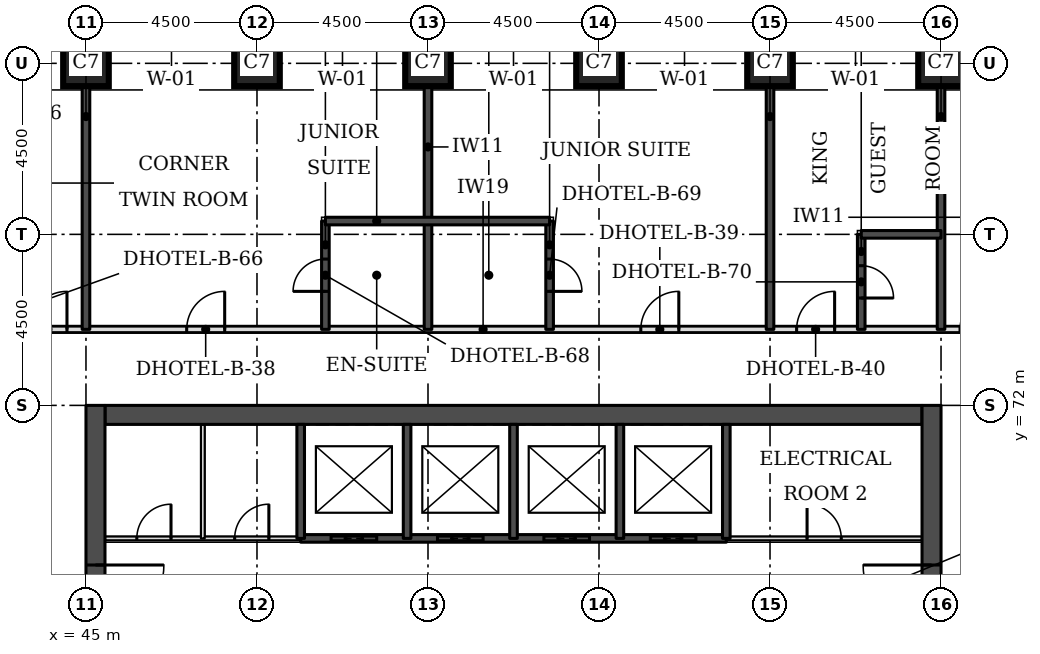
"""IFC4 building model, lengths in metres.
Left out: names, types, materials, properties, quantities, classifications, styles, units other than length and angle.
Written with IfcOpenShell. Run it as: python <this file> out.ifc"""

import sys

from ifc_helpers import new_model, si_unit, direction, frame, frame_2d, origin, origin_2d, place, context, subcontext, project, spatial, rectangle, extrude, element, fill, save


model = new_model("IFC4")
c1 = context("Model", 3, precision=1e-05, world=origin(), true_north=direction((0.0, 1.0)))
c2 = subcontext(c1, "Body", "Model", "MODEL_VIEW")
j1 = project(units=[si_unit("LENGTHUNIT", "METRE"), si_unit("PLANEANGLEUNIT", "RADIAN")], contexts=[c1])
p1 = place(None, origin())
s1 = spatial("IfcSite", under=j1, at=p1, CompositionType="ELEMENT")
p2 = place(p1, origin())
s2 = spatial("IfcBuilding", under=s1, at=p2, CompositionType="ELEMENT")
p3 = place(p2, frame((0.0, 0.0, 52.8)))
s3 = spatial("IfcBuildingStorey", under=s2, at=p3, CompositionType="ELEMENT", Elevation=52.8)
for number, where, z_axis, x_axis in (
    (1, (45.0, 81.0, 0.0), (0.0, 0.0, 1.0), (1.0, 0.0, 0.0)),
    (2, (49.5, 81.0, 0.0), (0.0, 0.0, 1.0), (1.0, 0.0, 0.0)),
    (3, (54.0, 81.0, 0.0), (0.0, 0.0, 1.0), (1.0, 0.0, 0.0)),
    (4, (58.5, 81.0, 0.0), (0.0, 0.0, 1.0), (1.0, 0.0, 0.0)),
    (5, (63.0, 81.0, 0.0), (0.0, 0.0, 1.0), (1.0, 0.0, 0.0)),
    (6, (67.5, 81.0, 0.0), (0.0, 0.0, 1.0), (1.0, 0.0, 0.0)),
):
    element("IfcColumn", number, at=place(p3, frame(where, z_axis=z_axis, x_axis=x_axis)), inside=s3, PredefinedType="COLUMN", context=c2, shape_type="SweptSolid", body=[
        extrude(rectangle(XDim=1.2, YDim=1.2, at=origin_2d()), origin(), (0.0, 0.0, 1.0), 3.3),
    ])
p4 = place(p3, frame((45.5, 71.75, 0.0), z_axis=(0.0, 0.0, 1.0), x_axis=(1.0, 0.0, 0.0)))
e7 = element("IfcWall", 7, at=p4, inside=s3, PredefinedType="SHEAR", context=c2, shape_type="SweptSolid", body=[
    extrude(rectangle(XDim=21.5, YDim=0.5, at=frame_2d((10.75, 0.0))), origin(), (0.0, 0.0, 1.0), 3.3),
])
p5 = place(p3, frame((45.25, 49.5, 0.0), z_axis=(0.0, 0.0, 1.0), x_axis=(0.0, 1.0, 0.0)))
e8 = element("IfcWall", 8, at=p5, inside=s3, PredefinedType="SHEAR", context=c2, shape_type="SweptSolid", body=[
    extrude(rectangle(XDim=22.5, YDim=0.5, at=frame_2d((11.25, 0.0))), origin(), (0.0, 0.0, 1.0), 3.3),
])
p6 = place(p5, frame((4.2, 0.0, 0.0)))
e9 = element("IfcOpeningElement", 9, at=p6, cuts=e8, PredefinedType="OPENING", context=c2, shape_type="SweptSolid", body=[
    extrude(rectangle(XDim=1.8, YDim=2.1, at=frame_2d((0.9, 1.05))), frame((0.0, 0.26, 0.0), z_axis=(0.0, -1.0, 0.0), x_axis=(1.0, 0.0, 0.0)), (0.0, 0.0, 1.0), 0.52),
])
p7 = place(p5, frame((6.9, 0.0, 0.0)))
e10 = element("IfcOpeningElement", 10, at=p7, cuts=e8, PredefinedType="OPENING", context=c2, shape_type="SweptSolid", body=[
    extrude(rectangle(XDim=1.1, YDim=2.1, at=frame_2d((0.55, 1.05))), frame((0.0, 0.26, 0.0), z_axis=(0.0, -1.0, 0.0), x_axis=(1.0, 0.0, 0.0)), (0.0, 0.0, 1.0), 0.52),
])
p8 = place(p5, frame((13.6, 0.0, 0.0)))
e11 = element("IfcOpeningElement", 11, at=p8, cuts=e8, PredefinedType="OPENING", context=c2, shape_type="SweptSolid", body=[
    extrude(rectangle(XDim=1.1, YDim=2.1, at=frame_2d((0.55, 1.05))), frame((0.0, 0.26, 0.0), z_axis=(0.0, -1.0, 0.0), x_axis=(1.0, 0.0, 0.0)), (0.0, 0.0, 1.0), 0.52),
])
p9 = place(p5, frame((16.5, 0.0, 0.0)))
e12 = element("IfcOpeningElement", 12, at=p9, cuts=e8, PredefinedType="OPENING", context=c2, shape_type="SweptSolid", body=[
    extrude(rectangle(XDim=1.8, YDim=2.1, at=frame_2d((0.9, 1.05))), frame((0.0, 0.26, 0.0), z_axis=(0.0, -1.0, 0.0), x_axis=(1.0, 0.0, 0.0)), (0.0, 0.0, 1.0), 0.52),
])
p10 = place(p3, frame((67.25, 49.5, 0.0), z_axis=(0.0, 0.0, 1.0), x_axis=(0.0, 1.0, 0.0)))
e13 = element("IfcWall", 13, at=p10, inside=s3, PredefinedType="SHEAR", context=c2, shape_type="SweptSolid", body=[
    extrude(rectangle(XDim=22.5, YDim=0.5, at=frame_2d((11.25, 0.0))), origin(), (0.0, 0.0, 1.0), 3.3),
])
p11 = place(p10, frame((4.2, 0.0, 0.0)))
e14 = element("IfcOpeningElement", 14, at=p11, cuts=e13, PredefinedType="OPENING", context=c2, shape_type="SweptSolid", body=[
    extrude(rectangle(XDim=1.8, YDim=2.1, at=frame_2d((0.9, 1.05))), frame((0.0, 0.26, 0.0), z_axis=(0.0, -1.0, 0.0), x_axis=(1.0, 0.0, 0.0)), (0.0, 0.0, 1.0), 0.52),
])
p12 = place(p10, frame((6.9, 0.0, 0.0)))
e15 = element("IfcOpeningElement", 15, at=p12, cuts=e13, PredefinedType="OPENING", context=c2, shape_type="SweptSolid", body=[
    extrude(rectangle(XDim=1.1, YDim=2.1, at=frame_2d((0.55, 1.05))), frame((0.0, 0.26, 0.0), z_axis=(0.0, -1.0, 0.0), x_axis=(1.0, 0.0, 0.0)), (0.0, 0.0, 1.0), 0.52),
])
p13 = place(p10, frame((13.6, 0.0, 0.0)))
e16 = element("IfcOpeningElement", 16, at=p13, cuts=e13, PredefinedType="OPENING", context=c2, shape_type="SweptSolid", body=[
    extrude(rectangle(XDim=1.1, YDim=2.1, at=frame_2d((0.55, 1.05))), frame((0.0, 0.26, 0.0), z_axis=(0.0, -1.0, 0.0), x_axis=(1.0, 0.0, 0.0)), (0.0, 0.0, 1.0), 0.52),
])
p14 = place(p10, frame((16.5, 0.0, 0.0)))
e17 = element("IfcOpeningElement", 17, at=p14, cuts=e13, PredefinedType="OPENING", context=c2, shape_type="SweptSolid", body=[
    extrude(rectangle(XDim=1.8, YDim=2.1, at=frame_2d((0.9, 1.05))), frame((0.0, 0.26, 0.0), z_axis=(0.0, -1.0, 0.0), x_axis=(1.0, 0.0, 0.0)), (0.0, 0.0, 1.0), 0.52),
])
p15 = place(p3, frame((43.0, 74.0, 0.0), z_axis=(0.0, 0.0, 1.0), x_axis=(1.0, 0.0, 0.0)))
e18 = element("IfcWall", 18, at=p15, inside=s3, PredefinedType="PARTITIONING", context=c2, shape_type="SweptSolid", body=[
    extrude(rectangle(XDim=26.5, YDim=0.15, at=frame_2d((13.25, 0.0))), origin(), (0.0, 0.0, 1.0), 3.08),
])
p16 = place(p15, frame((4.65, 0.0, 0.0)))
e19 = element("IfcOpeningElement", 19, at=p16, cuts=e18, PredefinedType="OPENING", context=c2, shape_type="SweptSolid", body=[
    extrude(rectangle(XDim=1.0, YDim=2.1, at=frame_2d((0.5, 1.05))), frame((0.0, 0.085, 0.0), z_axis=(0.0, -1.0, 0.0), x_axis=(1.0, 0.0, 0.0)), (0.0, 0.0, 1.0), 0.17),
])
p17 = place(p15, frame((16.6, 0.0, 0.0)))
e20 = element("IfcOpeningElement", 20, at=p17, cuts=e18, PredefinedType="OPENING", context=c2, shape_type="SweptSolid", body=[
    extrude(rectangle(XDim=1.0, YDim=2.1, at=frame_2d((0.5, 1.05))), frame((0.0, 0.085, 0.0), z_axis=(0.0, -1.0, 0.0), x_axis=(1.0, 0.0, 0.0)), (0.0, 0.0, 1.0), 0.17),
])
p18 = place(p15, frame((20.7, 0.0, 0.0)))
e21 = element("IfcOpeningElement", 21, at=p18, cuts=e18, PredefinedType="OPENING", context=c2, shape_type="SweptSolid", body=[
    extrude(rectangle(XDim=1.0, YDim=2.1, at=frame_2d((0.5, 1.05))), frame((0.0, 0.085, 0.0), z_axis=(0.0, -1.0, 0.0), x_axis=(1.0, 0.0, 0.0)), (0.0, 0.0, 1.0), 0.17),
])
p19 = place(p15, frame((0.5, 0.0, 0.0)))
e22 = element("IfcOpeningElement", 22, at=p19, cuts=e18, PredefinedType="OPENING", context=c2, shape_type="SweptSolid", body=[
    extrude(rectangle(XDim=1.0, YDim=2.1, at=frame_2d((0.5, 1.05))), frame((0.0, 0.085, 0.0), z_axis=(0.0, -1.0, 0.0), x_axis=(1.0, 0.0, 0.0)), (0.0, 0.0, 1.0), 0.17),
])
p20 = place(p15, frame((25.0, 0.0, 0.0)))
e23 = element("IfcOpeningElement", 23, at=p20, cuts=e18, PredefinedType="OPENING", context=c2, shape_type="SweptSolid", body=[
    extrude(rectangle(XDim=1.0, YDim=2.1, at=frame_2d((0.5, 1.05))), frame((0.0, 0.085, 0.0), z_axis=(0.0, -1.0, 0.0), x_axis=(1.0, 0.0, 0.0)), (0.0, 0.0, 1.0), 0.17),
])
p21 = place(p3, frame((45.0, 74.0, 0.0), z_axis=(0.0, 0.0, 1.0), x_axis=(0.0, 1.0, 0.0)))
e24 = element("IfcWall", 24, at=p21, inside=s3, PredefinedType="SOLIDWALL", context=c2, shape_type="SweptSolid", body=[
    extrude(rectangle(XDim=6.4, YDim=0.2, at=frame_2d((3.2, 0.0))), origin(), (0.0, 0.0, 1.0), 3.08),
])
p22 = place(p3, frame((51.3, 74.0, 0.0), z_axis=(0.0, 0.0, 1.0), x_axis=(0.0, 1.0, 0.0)))
e25 = element("IfcWall", 25, at=p22, inside=s3, PredefinedType="SOLIDWALL", context=c2, shape_type="SweptSolid", body=[
    extrude(rectangle(XDim=2.85, YDim=0.2, at=frame_2d((1.425, 0.0))), origin(), (0.0, 0.0, 1.0), 3.08),
])
p23 = place(p22, frame((1.0, 0.0, 0.0)))
e26 = element("IfcOpeningElement", 26, at=p23, cuts=e25, PredefinedType="OPENING", context=c2, shape_type="SweptSolid", body=[
    extrude(rectangle(XDim=0.85, YDim=2.1, at=frame_2d((0.425, 1.05))), frame((0.0, 0.11, 0.0), z_axis=(0.0, -1.0, 0.0), x_axis=(1.0, 0.0, 0.0)), (0.0, 0.0, 1.0), 0.22),
])
p24 = place(p3, frame((54.0, 74.0, 0.0), z_axis=(0.0, 0.0, 1.0), x_axis=(0.0, 1.0, 0.0)))
e27 = element("IfcWall", 27, at=p24, inside=s3, PredefinedType="SOLIDWALL", context=c2, shape_type="SweptSolid", body=[
    extrude(rectangle(XDim=6.4, YDim=0.2, at=frame_2d((3.2, 0.0))), origin(), (0.0, 0.0, 1.0), 3.08),
])
p25 = place(p3, frame((57.2, 74.0, 0.0), z_axis=(0.0, 0.0, 1.0), x_axis=(0.0, 1.0, 0.0)))
e28 = element("IfcWall", 28, at=p25, inside=s3, PredefinedType="SOLIDWALL", context=c2, shape_type="SweptSolid", body=[
    extrude(rectangle(XDim=2.85, YDim=0.2, at=frame_2d((1.425, 0.0))), origin(), (0.0, 0.0, 1.0), 3.08),
])
p26 = place(p25, frame((1.0, 0.0, 0.0)))
e29 = element("IfcOpeningElement", 29, at=p26, cuts=e28, PredefinedType="OPENING", context=c2, shape_type="SweptSolid", body=[
    extrude(rectangle(XDim=0.85, YDim=2.1, at=frame_2d((0.425, 1.05))), frame((0.0, 0.11, 0.0), z_axis=(0.0, -1.0, 0.0), x_axis=(1.0, 0.0, 0.0)), (0.0, 0.0, 1.0), 0.22),
])
p27 = place(p3, frame((63.0, 74.0, 0.0), z_axis=(0.0, 0.0, 1.0), x_axis=(0.0, 1.0, 0.0)))
e30 = element("IfcWall", 30, at=p27, inside=s3, PredefinedType="SOLIDWALL", context=c2, shape_type="SweptSolid", body=[
    extrude(rectangle(XDim=6.4, YDim=0.2, at=frame_2d((3.2, 0.0))), origin(), (0.0, 0.0, 1.0), 3.08),
])
p28 = place(p3, frame((65.4, 74.0, 0.0), z_axis=(0.0, 0.0, 1.0), x_axis=(0.0, 1.0, 0.0)))
e31 = element("IfcWall", 31, at=p28, inside=s3, PredefinedType="SOLIDWALL", context=c2, shape_type="SweptSolid", body=[
    extrude(rectangle(XDim=2.5, YDim=0.2, at=frame_2d((1.25, 0.0))), origin(), (0.0, 0.0, 1.0), 3.08),
])
p29 = place(p28, frame((0.825, 0.0, 0.0)))
e32 = element("IfcOpeningElement", 32, at=p29, cuts=e31, PredefinedType="OPENING", context=c2, shape_type="SweptSolid", body=[
    extrude(rectangle(XDim=0.85, YDim=2.1, at=frame_2d((0.425, 1.05))), frame((0.0, 0.11, 0.0), z_axis=(0.0, -1.0, 0.0), x_axis=(1.0, 0.0, 0.0)), (0.0, 0.0, 1.0), 0.22),
])
p30 = place(p3, frame((67.5, 74.0, 0.0), z_axis=(0.0, 0.0, 1.0), x_axis=(0.0, 1.0, 0.0)))
e33 = element("IfcWall", 33, at=p30, inside=s3, PredefinedType="SOLIDWALL", context=c2, shape_type="SweptSolid", body=[
    extrude(rectangle(XDim=6.4, YDim=0.2, at=frame_2d((3.2, 0.0))), origin(), (0.0, 0.0, 1.0), 3.08),
])
p31 = place(p3, frame((65.4, 76.5, 0.0), z_axis=(0.0, 0.0, 1.0), x_axis=(1.0, 0.0, 0.0)))
e34 = element("IfcWall", 34, at=p31, inside=s3, PredefinedType="SOLIDWALL", context=c2, shape_type="SweptSolid", body=[
    extrude(rectangle(XDim=2.1, YDim=0.2, at=frame_2d((1.05, 0.0))), origin(), (0.0, 0.0, 1.0), 3.08),
])
p32 = place(p3, frame((51.3, 76.85, 0.0), z_axis=(0.0, 0.0, 1.0), x_axis=(1.0, 0.0, 0.0)))
e35 = element("IfcWall", 35, at=p32, inside=s3, PredefinedType="SOLIDWALL", context=c2, shape_type="SweptSolid", body=[
    extrude(rectangle(XDim=5.9, YDim=0.2, at=frame_2d((2.95, 0.0))), origin(), (0.0, 0.0, 1.0), 3.08),
])
p33 = place(p3, frame((45.5, 68.5, 0.0), z_axis=(0.0, 0.0, 1.0), x_axis=(1.0, 0.0, 0.0)))
e36 = element("IfcWall", 36, at=p33, inside=s3, PredefinedType="PARTITIONING", context=c2, shape_type="SweptSolid", body=[
    extrude(rectangle(XDim=5.15, YDim=0.1, at=frame_2d((2.575, 0.0))), origin(), (0.0, 0.0, 1.0), 3.08),
])
p34 = place(p33, frame((0.837, 0.0, 0.0)))
e37 = element("IfcOpeningElement", 37, at=p34, cuts=e36, PredefinedType="OPENING", context=c2, shape_type="SweptSolid", body=[
    extrude(rectangle(XDim=0.9, YDim=2.1, at=frame_2d((0.45, 1.05))), frame((0.0, 0.06, 0.0), z_axis=(0.0, -1.0, 0.0), x_axis=(1.0, 0.0, 0.0)), (0.0, 0.0, 1.0), 0.12),
])
p35 = place(p33, frame((3.413, 0.0, 0.0)))
e38 = element("IfcOpeningElement", 38, at=p35, cuts=e36, PredefinedType="OPENING", context=c2, shape_type="SweptSolid", body=[
    extrude(rectangle(XDim=0.9, YDim=2.1, at=frame_2d((0.45, 1.05))), frame((0.0, 0.06, 0.0), z_axis=(0.0, -1.0, 0.0), x_axis=(1.0, 0.0, 0.0)), (0.0, 0.0, 1.0), 0.12),
])
p36 = place(p3, frame((61.85, 68.5, 0.0), z_axis=(0.0, 0.0, 1.0), x_axis=(1.0, 0.0, 0.0)))
e39 = element("IfcWall", 39, at=p36, inside=s3, PredefinedType="PARTITIONING", context=c2, shape_type="SweptSolid", body=[
    extrude(rectangle(XDim=5.15, YDim=0.1, at=frame_2d((2.575, 0.0))), origin(), (0.0, 0.0, 1.0), 3.08),
])
p37 = place(p36, frame((2.125, 0.0, 0.0)))
e40 = element("IfcOpeningElement", 40, at=p37, cuts=e39, PredefinedType="OPENING", context=c2, shape_type="SweptSolid", body=[
    extrude(rectangle(XDim=0.9, YDim=2.1, at=frame_2d((0.45, 1.05))), frame((0.0, 0.06, 0.0), z_axis=(0.0, -1.0, 0.0), x_axis=(1.0, 0.0, 0.0)), (0.0, 0.0, 1.0), 0.12),
])
p38 = place(p3, frame((50.65, 68.5, 0.0), z_axis=(0.0, 0.0, 1.0), x_axis=(1.0, 0.0, 0.0)))
e41 = element("IfcWall", 41, at=p38, inside=s3, PredefinedType="SOLIDWALL", context=c2, shape_type="SweptSolid", body=[
    extrude(rectangle(XDim=11.2, YDim=0.2, at=frame_2d((5.6, 0.0))), origin(), (0.0, 0.0, 1.0), 3.08),
])
p39 = place(p38, frame((0.8, 0.0, 0.0)))
e42 = element("IfcOpeningElement", 42, at=p39, cuts=e41, PredefinedType="OPENING", context=c2, shape_type="SweptSolid", body=[
    extrude(rectangle(XDim=1.2, YDim=2.1, at=frame_2d((0.6, 1.05))), frame((0.0, 0.11, 0.0), z_axis=(0.0, -1.0, 0.0), x_axis=(1.0, 0.0, 0.0)), (0.0, 0.0, 1.0), 0.22),
])
p40 = place(p38, frame((3.6, 0.0, 0.0)))
e43 = element("IfcOpeningElement", 43, at=p40, cuts=e41, PredefinedType="OPENING", context=c2, shape_type="SweptSolid", body=[
    extrude(rectangle(XDim=1.2, YDim=2.1, at=frame_2d((0.6, 1.05))), frame((0.0, 0.11, 0.0), z_axis=(0.0, -1.0, 0.0), x_axis=(1.0, 0.0, 0.0)), (0.0, 0.0, 1.0), 0.22),
])
p41 = place(p38, frame((6.4, 0.0, 0.0)))
e44 = element("IfcOpeningElement", 44, at=p41, cuts=e41, PredefinedType="OPENING", context=c2, shape_type="SweptSolid", body=[
    extrude(rectangle(XDim=1.2, YDim=2.1, at=frame_2d((0.6, 1.05))), frame((0.0, 0.11, 0.0), z_axis=(0.0, -1.0, 0.0), x_axis=(1.0, 0.0, 0.0)), (0.0, 0.0, 1.0), 0.22),
])
p42 = place(p38, frame((9.2, 0.0, 0.0)))
e45 = element("IfcOpeningElement", 45, at=p42, cuts=e41, PredefinedType="OPENING", context=c2, shape_type="SweptSolid", body=[
    extrude(rectangle(XDim=1.2, YDim=2.1, at=frame_2d((0.6, 1.05))), frame((0.0, 0.11, 0.0), z_axis=(0.0, -1.0, 0.0), x_axis=(1.0, 0.0, 0.0)), (0.0, 0.0, 1.0), 0.22),
])
p43 = place(p3, frame((48.075, 68.5, 0.0), z_axis=(0.0, 0.0, 1.0), x_axis=(0.0, 1.0, 0.0)))
e46 = element("IfcWall", 46, at=p43, inside=s3, PredefinedType="PARTITIONING", context=c2, shape_type="SweptSolid", body=[
    extrude(rectangle(XDim=3.0, YDim=0.1, at=frame_2d((1.5, 0.0))), origin(), (0.0, 0.0, 1.0), 3.08),
])
for number, where, z_axis, x_axis in (
    (47, (50.65, 68.5, 0.0), (0.0, 0.0, 1.0), (0.0, 1.0, 0.0)),
    (48, (53.45, 68.5, 0.0), (0.0, 0.0, 1.0), (0.0, 1.0, 0.0)),
    (49, (56.25, 68.5, 0.0), (0.0, 0.0, 1.0), (0.0, 1.0, 0.0)),
    (50, (59.05, 68.5, 0.0), (0.0, 0.0, 1.0), (0.0, 1.0, 0.0)),
    (51, (61.85, 68.5, 0.0), (0.0, 0.0, 1.0), (0.0, 1.0, 0.0)),
):
    element("IfcWall", number, at=place(p3, frame(where, z_axis=z_axis, x_axis=x_axis)), inside=s3, PredefinedType="SOLIDWALL", context=c2, shape_type="SweptSolid", body=[
        extrude(rectangle(XDim=3.0, YDim=0.2, at=frame_2d((1.5, 0.0))), origin(), (0.0, 0.0, 1.0), 3.08),
    ])
p44 = place(p16, origin())
e52 = element("IfcDoor", 52, at=p44, inside=s3, OperationType="SINGLE_SWING_RIGHT", PredefinedType="DOOR", context=c2, shape_type="SweptSolid", body=[
    extrude(rectangle(XDim=1.0, YDim=2.1, at=frame_2d((0.5, 1.05))), frame((0.0, 0.025, 0.0), z_axis=(0.0, -1.0, 0.0), x_axis=(1.0, 0.0, 0.0)), (0.0, 0.0, 1.0), 0.05),
])
fill(e19, e52)
p45 = place(p23, origin())
e53 = element("IfcDoor", 53, at=p45, inside=s3, OperationType="SINGLE_SWING_LEFT", PredefinedType="DOOR", context=c2, shape_type="SweptSolid", body=[
    extrude(rectangle(XDim=0.85, YDim=2.1, at=frame_2d((0.425, 1.05))), frame((0.0, 0.025, 0.0), z_axis=(0.0, -1.0, 0.0), x_axis=(1.0, 0.0, 0.0)), (0.0, 0.0, 1.0), 0.05),
])
fill(e26, e53)
p46 = place(p17, origin())
e54 = element("IfcDoor", 54, at=p46, inside=s3, OperationType="SINGLE_SWING_RIGHT", PredefinedType="DOOR", context=c2, shape_type="SweptSolid", body=[
    extrude(rectangle(XDim=1.0, YDim=2.1, at=frame_2d((0.5, 1.05))), frame((0.0, 0.025, 0.0), z_axis=(0.0, -1.0, 0.0), x_axis=(1.0, 0.0, 0.0)), (0.0, 0.0, 1.0), 0.05),
])
fill(e20, e54)
p47 = place(p26, frame((0.85, 0.0, 0.0), z_axis=(0.0, 0.0, 1.0), x_axis=(-1.0, 0.0, 0.0)))
e55 = element("IfcDoor", 55, at=p47, inside=s3, OperationType="SINGLE_SWING_RIGHT", PredefinedType="DOOR", context=c2, shape_type="SweptSolid", body=[
    extrude(rectangle(XDim=0.85, YDim=2.1, at=frame_2d((0.425, 1.05))), frame((0.0, 0.025, 0.0), z_axis=(0.0, -1.0, 0.0), x_axis=(1.0, 0.0, 0.0)), (0.0, 0.0, 1.0), 0.05),
])
fill(e29, e55)
p48 = place(p18, origin())
e56 = element("IfcDoor", 56, at=p48, inside=s3, OperationType="SINGLE_SWING_RIGHT", PredefinedType="DOOR", context=c2, shape_type="SweptSolid", body=[
    extrude(rectangle(XDim=1.0, YDim=2.1, at=frame_2d((0.5, 1.05))), frame((0.0, 0.025, 0.0), z_axis=(0.0, -1.0, 0.0), x_axis=(1.0, 0.0, 0.0)), (0.0, 0.0, 1.0), 0.05),
])
fill(e21, e56)
p49 = place(p29, frame((0.85, 0.0, 0.0), z_axis=(0.0, 0.0, 1.0), x_axis=(-1.0, 0.0, 0.0)))
e57 = element("IfcDoor", 57, at=p49, inside=s3, OperationType="SINGLE_SWING_RIGHT", PredefinedType="DOOR", context=c2, shape_type="SweptSolid", body=[
    extrude(rectangle(XDim=0.85, YDim=2.1, at=frame_2d((0.425, 1.05))), frame((0.0, 0.025, 0.0), z_axis=(0.0, -1.0, 0.0), x_axis=(1.0, 0.0, 0.0)), (0.0, 0.0, 1.0), 0.05),
])
fill(e32, e57)
p50 = place(p19, origin())
e58 = element("IfcDoor", 58, at=p50, inside=s3, OperationType="SINGLE_SWING_RIGHT", PredefinedType="DOOR", context=c2, shape_type="SweptSolid", body=[
    extrude(rectangle(XDim=1.0, YDim=2.1, at=frame_2d((0.5, 1.05))), frame((0.0, 0.025, 0.0), z_axis=(0.0, -1.0, 0.0), x_axis=(1.0, 0.0, 0.0)), (0.0, 0.0, 1.0), 0.05),
])
fill(e22, e58)
p51 = place(p39, origin())
e59 = element("IfcDoor", 59, at=p51, inside=s3, OperationType="DOUBLE_DOOR_SLIDING", PredefinedType="DOOR", context=c2, shape_type="SweptSolid", body=[
    extrude(rectangle(XDim=1.2, YDim=2.1, at=frame_2d((0.6, 1.05))), frame((0.0, 0.025, 0.0), z_axis=(0.0, -1.0, 0.0), x_axis=(1.0, 0.0, 0.0)), (0.0, 0.0, 1.0), 0.05),
])
fill(e42, e59)
p52 = place(p40, origin())
e60 = element("IfcDoor", 60, at=p52, inside=s3, OperationType="DOUBLE_DOOR_SLIDING", PredefinedType="DOOR", context=c2, shape_type="SweptSolid", body=[
    extrude(rectangle(XDim=1.2, YDim=2.1, at=frame_2d((0.6, 1.05))), frame((0.0, 0.025, 0.0), z_axis=(0.0, -1.0, 0.0), x_axis=(1.0, 0.0, 0.0)), (0.0, 0.0, 1.0), 0.05),
])
fill(e43, e60)
p53 = place(p41, origin())
e61 = element("IfcDoor", 61, at=p53, inside=s3, OperationType="DOUBLE_DOOR_SLIDING", PredefinedType="DOOR", context=c2, shape_type="SweptSolid", body=[
    extrude(rectangle(XDim=1.2, YDim=2.1, at=frame_2d((0.6, 1.05))), frame((0.0, 0.025, 0.0), z_axis=(0.0, -1.0, 0.0), x_axis=(1.0, 0.0, 0.0)), (0.0, 0.0, 1.0), 0.05),
])
fill(e44, e61)
p54 = place(p42, origin())
e62 = element("IfcDoor", 62, at=p54, inside=s3, OperationType="DOUBLE_DOOR_SLIDING", PredefinedType="DOOR", context=c2, shape_type="SweptSolid", body=[
    extrude(rectangle(XDim=1.2, YDim=2.1, at=frame_2d((0.6, 1.05))), frame((0.0, 0.025, 0.0), z_axis=(0.0, -1.0, 0.0), x_axis=(1.0, 0.0, 0.0)), (0.0, 0.0, 1.0), 0.05),
])
fill(e45, e62)
p55 = place(p9, frame((1.8, 0.0, 0.0), z_axis=(0.0, 0.0, 1.0), x_axis=(-1.0, 0.0, 0.0)))
e63 = element("IfcDoor", 63, at=p55, inside=s3, OperationType="SINGLE_SWING_LEFT", PredefinedType="DOOR", context=c2, shape_type="SweptSolid", body=[
    extrude(rectangle(XDim=1.8, YDim=2.1, at=frame_2d((0.9, 1.05))), frame((0.0, 0.025, 0.0), z_axis=(0.0, -1.0, 0.0), x_axis=(1.0, 0.0, 0.0)), (0.0, 0.0, 1.0), 0.05),
])
fill(e12, e63)
p56 = place(p14, origin())
e64 = element("IfcDoor", 64, at=p56, inside=s3, OperationType="SINGLE_SWING_RIGHT", PredefinedType="DOOR", context=c2, shape_type="SweptSolid", body=[
    extrude(rectangle(XDim=1.8, YDim=2.1, at=frame_2d((0.9, 1.05))), frame((0.0, 0.025, 0.0), z_axis=(0.0, -1.0, 0.0), x_axis=(1.0, 0.0, 0.0)), (0.0, 0.0, 1.0), 0.05),
])
fill(e17, e64)
p57 = place(p37, origin())
e65 = element("IfcDoor", 65, at=p57, inside=s3, OperationType="SINGLE_SWING_LEFT", PredefinedType="DOOR", context=c2, shape_type="SweptSolid", body=[
    extrude(rectangle(XDim=0.9, YDim=2.1, at=frame_2d((0.45, 1.05))), frame((0.0, 0.025, 0.0), z_axis=(0.0, -1.0, 0.0), x_axis=(1.0, 0.0, 0.0)), (0.0, 0.0, 1.0), 0.05),
])
fill(e40, e65)
p58 = place(p34, origin())
e66 = element("IfcDoor", 66, at=p58, inside=s3, OperationType="SINGLE_SWING_RIGHT", PredefinedType="DOOR", context=c2, shape_type="SweptSolid", body=[
    extrude(rectangle(XDim=0.9, YDim=2.1, at=frame_2d((0.45, 1.05))), frame((0.0, 0.025, 0.0), z_axis=(0.0, -1.0, 0.0), x_axis=(1.0, 0.0, 0.0)), (0.0, 0.0, 1.0), 0.05),
])
fill(e37, e66)
p59 = place(p35, origin())
e67 = element("IfcDoor", 67, at=p59, inside=s3, OperationType="SINGLE_SWING_RIGHT", PredefinedType="DOOR", context=c2, shape_type="SweptSolid", body=[
    extrude(rectangle(XDim=0.9, YDim=2.1, at=frame_2d((0.45, 1.05))), frame((0.0, 0.025, 0.0), z_axis=(0.0, -1.0, 0.0), x_axis=(1.0, 0.0, 0.0)), (0.0, 0.0, 1.0), 0.05),
])
fill(e38, e67)
save(model, sys.argv[1])
